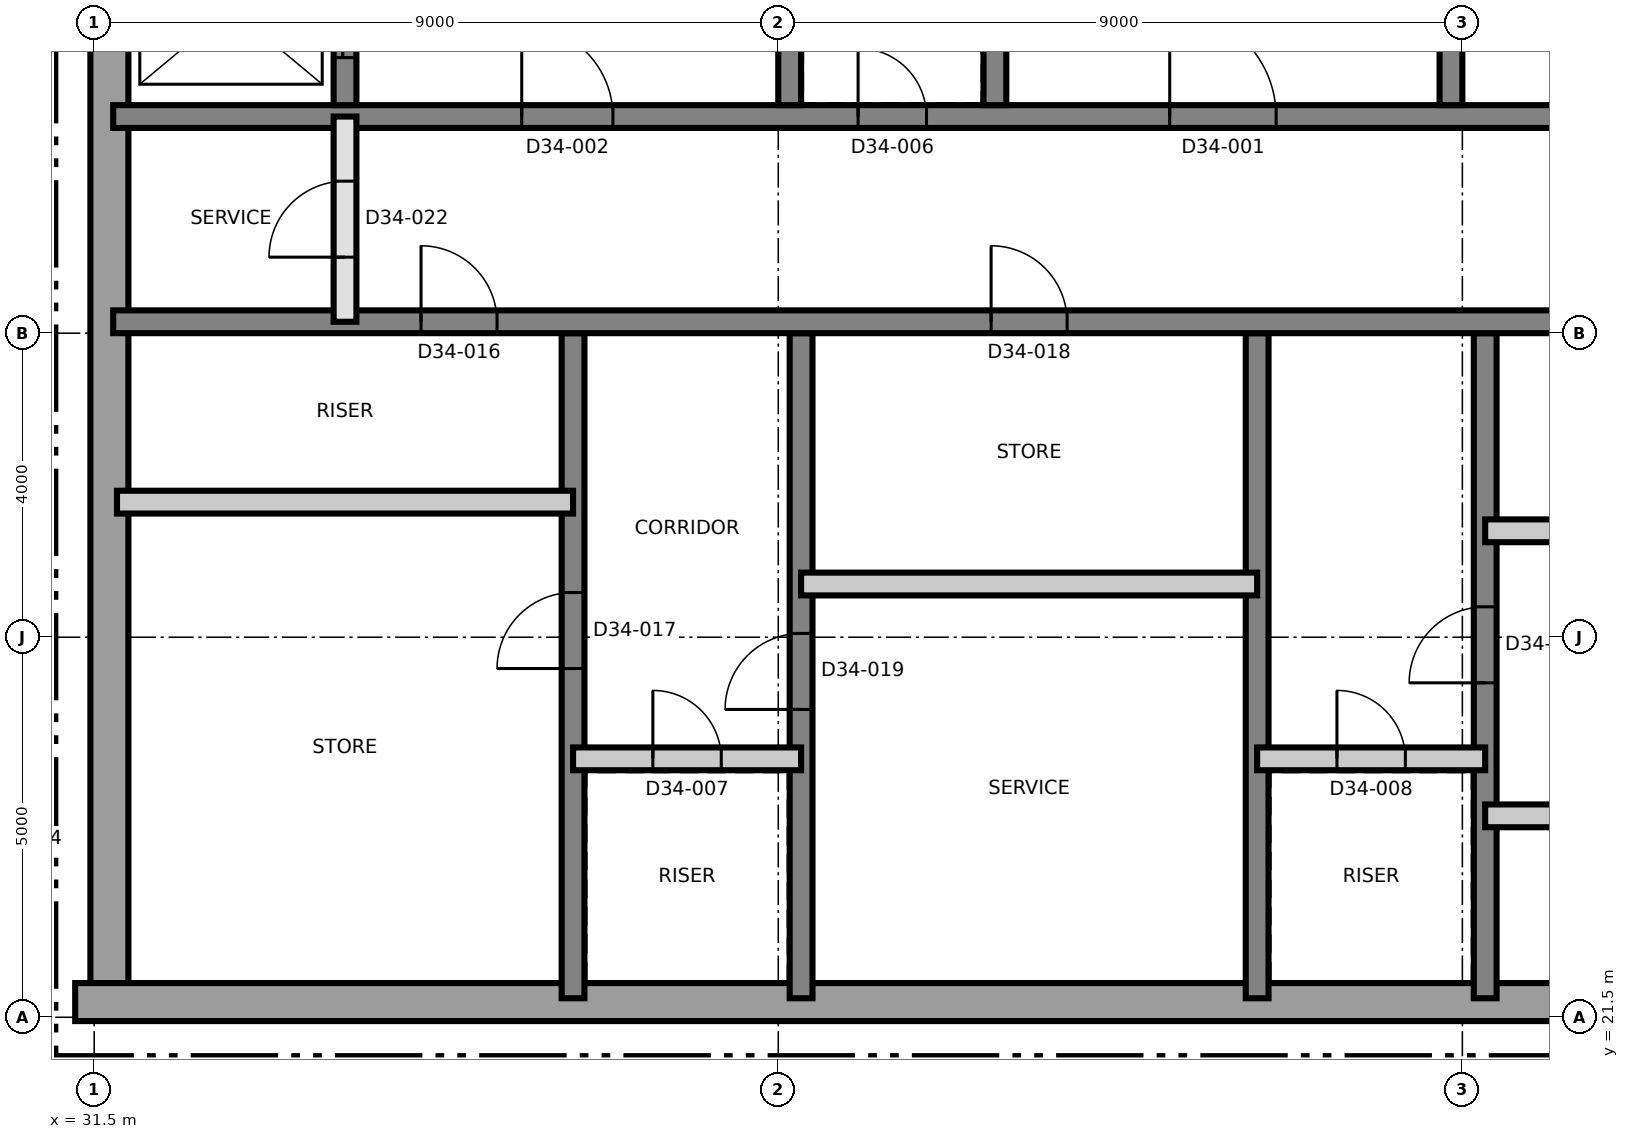
"""IFC4 building model, lengths in metres.
Left out: names, types, materials, properties, quantities, classifications, styles, units other than length and angle.
Written with IfcOpenShell. Run it as: python <this file> out.ifc"""

import sys

from ifc_helpers import new_model, si_unit, direction, frame, frame_2d, origin, place, context, subcontext, project, spatial, polyline, rectangle, outline, extrude, element, fill, save


model = new_model("IFC4")
c1 = context("Model", 3, precision=1e-05, world=origin(), true_north=direction((0.0, 1.0)))
c2 = subcontext(c1, "Body", "Model", "MODEL_VIEW")
j1 = project(units=[si_unit("LENGTHUNIT", "METRE"), si_unit("PLANEANGLEUNIT", "RADIAN")], contexts=[c1])
p1 = place(None, origin())
s1 = spatial("IfcSite", under=j1, at=p1, CompositionType="ELEMENT")
p2 = place(p1, origin())
s2 = spatial("IfcBuilding", under=s1, at=p2, CompositionType="ELEMENT")
p3 = place(p2, frame((0.0, 0.0, 281.3)))
s3 = spatial("IfcBuildingStorey", under=s2, at=p3, CompositionType="ELEMENT", Elevation=281.3)
p4 = place(p3, frame((31.7, 21.75, 0.0), z_axis=(0.0, 0.0, 1.0), x_axis=(0.0, 1.0, 0.0)))
e1 = element("IfcWall", 1, at=p4, inside=s3, PredefinedType="SHEAR", context=c2, shape_type="SweptSolid", body=[
    extrude(outline(polyline([(0.0, 0.0), (17.5, 0.0), (17.5, 2.46), (14.941, 4.2), (0.0, 4.2), (0.0, 0.0)])), frame((0.0, 0.25, 0.0), z_axis=(0.0, -1.0, 0.0), x_axis=(1.0, 0.0, 0.0)), (0.0, 0.0, 1.0), 0.5),
])
p5 = place(p3, frame((31.25, 21.7, 0.0), z_axis=(0.0, 0.0, 1.0), x_axis=(1.0, 0.0, 0.0)))
e2 = element("IfcWall", 2, at=p5, inside=s3, PredefinedType="SHEAR", context=c2, shape_type="SweptSolid", body=[
    extrude(rectangle(XDim=27.0, YDim=0.5, at=frame_2d((13.5, 0.0))), origin(), (0.0, 0.0, 1.0), 4.2),
])
p6 = place(p3, frame((37.8, 21.75, 0.0), z_axis=(0.0, 0.0, 1.0), x_axis=(0.0, 1.0, 0.0)))
e3 = element("IfcWall", 3, at=p6, inside=s3, PredefinedType="SHEAR", context=c2, shape_type="SweptSolid", body=[
    extrude(rectangle(XDim=8.75, YDim=0.3, at=frame_2d((4.375, 0.0))), origin(), (0.0, 0.0, 1.0), 4.2),
])
p7 = place(p6, frame((4.338, 0.0, 0.0)))
e4 = element("IfcOpeningElement", 4, at=p7, cuts=e3, PredefinedType="OPENING", context=c2, shape_type="SweptSolid", body=[
    extrude(rectangle(XDim=1.0, YDim=2.1, at=frame_2d((0.5, 1.05))), frame((0.0, 0.16, 0.0), z_axis=(0.0, -1.0, 0.0), x_axis=(1.0, 0.0, 0.0)), (0.0, 0.0, 1.0), 0.32),
])
p8 = place(p3, frame((40.8, 21.75, 0.0), z_axis=(0.0, 0.0, 1.0), x_axis=(0.0, 1.0, 0.0)))
e5 = element("IfcWall", 5, at=p8, inside=s3, PredefinedType="SHEAR", context=c2, shape_type="SweptSolid", body=[
    extrude(rectangle(XDim=8.75, YDim=0.3, at=frame_2d((4.375, 0.0))), origin(), (0.0, 0.0, 1.0), 4.2),
])
p9 = place(p8, frame((3.8, 0.0, 0.0)))
e6 = element("IfcOpeningElement", 6, at=p9, cuts=e5, PredefinedType="OPENING", context=c2, shape_type="SweptSolid", body=[
    extrude(rectangle(XDim=1.0, YDim=2.1, at=frame_2d((0.5, 1.05))), frame((0.0, 0.16, 0.0), z_axis=(0.0, -1.0, 0.0), x_axis=(1.0, 0.0, 0.0)), (0.0, 0.0, 1.0), 0.32),
])
p10 = place(p3, frame((46.8, 21.75, 0.0), z_axis=(0.0, 0.0, 1.0), x_axis=(0.0, 1.0, 0.0)))
e7 = element("IfcWall", 7, at=p10, inside=s3, PredefinedType="SHEAR", context=c2, shape_type="SweptSolid", body=[
    extrude(rectangle(XDim=8.75, YDim=0.3, at=frame_2d((4.375, 0.0))), origin(), (0.0, 0.0, 1.0), 4.2),
])
p11 = place(p3, frame((49.8, 21.75, 0.0), z_axis=(0.0, 0.0, 1.0), x_axis=(0.0, 1.0, 0.0)))
e8 = element("IfcWall", 8, at=p11, inside=s3, PredefinedType="SHEAR", context=c2, shape_type="SweptSolid", body=[
    extrude(rectangle(XDim=8.75, YDim=0.3, at=frame_2d((4.375, 0.0))), origin(), (0.0, 0.0, 1.0), 4.2),
])
p12 = place(p11, frame((4.15, 0.0, 0.0)))
e9 = element("IfcOpeningElement", 9, at=p12, cuts=e8, PredefinedType="OPENING", context=c2, shape_type="SweptSolid", body=[
    extrude(rectangle(XDim=1.0, YDim=2.1, at=frame_2d((0.5, 1.05))), frame((0.0, 0.16, 0.0), z_axis=(0.0, -1.0, 0.0), x_axis=(1.0, 0.0, 0.0)), (0.0, 0.0, 1.0), 0.32),
])
p13 = place(p3, frame((31.75, 30.65, 0.0), z_axis=(0.0, 0.0, 1.0), x_axis=(1.0, 0.0, 0.0)))
e10 = element("IfcWall", 10, at=p13, inside=s3, PredefinedType="SHEAR", context=c2, shape_type="SweptSolid", body=[
    extrude(rectangle(XDim=26.5, YDim=0.3, at=frame_2d((13.25, 0.0))), origin(), (0.0, 0.0, 1.0), 4.2),
])
p14 = place(p13, frame((24.75, 0.0, 0.0)))
e11 = element("IfcOpeningElement", 11, at=p14, cuts=e10, PredefinedType="OPENING", context=c2, shape_type="SweptSolid", body=[
    extrude(rectangle(XDim=1.0, YDim=2.1, at=frame_2d((0.5, 1.05))), frame((0.0, 0.16, 0.0), z_axis=(0.0, -1.0, 0.0), x_axis=(1.0, 0.0, 0.0)), (0.0, 0.0, 1.0), 0.32),
])
p15 = place(p13, frame((4.05, 0.0, 0.0)))
e12 = element("IfcOpeningElement", 12, at=p15, cuts=e10, PredefinedType="OPENING", context=c2, shape_type="SweptSolid", body=[
    extrude(rectangle(XDim=1.0, YDim=2.1, at=frame_2d((0.5, 1.05))), frame((0.0, 0.16, 0.0), z_axis=(0.0, -1.0, 0.0), x_axis=(1.0, 0.0, 0.0)), (0.0, 0.0, 1.0), 0.32),
])
p16 = place(p13, frame((11.55, 0.0, 0.0)))
e13 = element("IfcOpeningElement", 13, at=p16, cuts=e10, PredefinedType="OPENING", context=c2, shape_type="SweptSolid", body=[
    extrude(rectangle(XDim=1.0, YDim=2.1, at=frame_2d((0.5, 1.05))), frame((0.0, 0.16, 0.0), z_axis=(0.0, -1.0, 0.0), x_axis=(1.0, 0.0, 0.0)), (0.0, 0.0, 1.0), 0.32),
])
p17 = place(p3, frame((31.75, 33.35, 0.0), z_axis=(0.0, 0.0, 1.0), x_axis=(1.0, 0.0, 0.0)))
e14 = element("IfcWall", 14, at=p17, inside=s3, PredefinedType="SHEAR", context=c2, shape_type="SweptSolid", body=[
    extrude(rectangle(XDim=26.5, YDim=0.3, at=frame_2d((13.25, 0.0))), origin(), (0.0, 0.0, 1.0), 4.2),
])
p18 = place(p17, frame((13.9, 0.0, 0.0)))
e15 = element("IfcOpeningElement", 15, at=p18, cuts=e14, PredefinedType="OPENING", context=c2, shape_type="SweptSolid", body=[
    extrude(rectangle(XDim=1.4, YDim=2.1, at=frame_2d((0.7, 1.05))), frame((0.0, 0.16, 0.0), z_axis=(0.0, -1.0, 0.0), x_axis=(1.0, 0.0, 0.0)), (0.0, 0.0, 1.0), 0.32),
])
p19 = place(p17, frame((5.375, 0.0, 0.0)))
e16 = element("IfcOpeningElement", 16, at=p19, cuts=e14, PredefinedType="OPENING", context=c2, shape_type="SweptSolid", body=[
    extrude(rectangle(XDim=1.2, YDim=2.1, at=frame_2d((0.6, 1.05))), frame((0.0, 0.16, 0.0), z_axis=(0.0, -1.0, 0.0), x_axis=(1.0, 0.0, 0.0)), (0.0, 0.0, 1.0), 0.32),
])
p20 = place(p17, frame((19.925, 0.0, 0.0)))
e17 = element("IfcOpeningElement", 17, at=p20, cuts=e14, PredefinedType="OPENING", context=c2, shape_type="SweptSolid", body=[
    extrude(rectangle(XDim=1.2, YDim=2.1, at=frame_2d((0.6, 1.05))), frame((0.0, 0.16, 0.0), z_axis=(0.0, -1.0, 0.0), x_axis=(1.0, 0.0, 0.0)), (0.0, 0.0, 1.0), 0.32),
])
p21 = place(p17, frame((9.8, 0.0, 0.0)))
e18 = element("IfcOpeningElement", 18, at=p21, cuts=e14, PredefinedType="OPENING", context=c2, shape_type="SweptSolid", body=[
    extrude(rectangle(XDim=0.9, YDim=2.1, at=frame_2d((0.45, 1.05))), frame((0.0, 0.16, 0.0), z_axis=(0.0, -1.0, 0.0), x_axis=(1.0, 0.0, 0.0)), (0.0, 0.0, 1.0), 0.32),
])
for number, where, z_axis, x_axis in (
    (19, (40.65, 33.5, 0.0), (0.0, 0.0, 1.0), (0.0, 1.0, 0.0)),
    (20, (43.35, 33.5, 0.0), (0.0, 0.0, 1.0), (0.0, 1.0, 0.0)),
):
    element("IfcWall", number, at=place(p3, frame(where, z_axis=z_axis, x_axis=x_axis)), inside=s3, PredefinedType="SHEAR", context=c2, shape_type="SweptSolid", body=[
        extrude(outline(polyline([(0.0, 0.0), (5.75, 0.0), (5.75, 2.46), (3.191, 4.2), (0.0, 4.2), (0.0, 0.0)])), frame((0.0, 0.15, 0.0), z_axis=(0.0, -1.0, 0.0), x_axis=(1.0, 0.0, 0.0)), (0.0, 0.0, 1.0), 0.3),
    ])
p22 = place(p3, frame((34.8, 33.5, 0.0), z_axis=(0.0, 0.0, 1.0), x_axis=(0.0, 1.0, 0.0)))
e21 = element("IfcWall", 21, at=p22, inside=s3, PredefinedType="SHEAR", context=c2, shape_type="SweptSolid", body=[
    extrude(rectangle(XDim=2.55, YDim=0.3, at=frame_2d((1.275, 0.0))), origin(), (0.0, 0.0, 1.0), 4.2),
])
p23 = place(p22, frame((0.625, 0.0, 0.0)))
e22 = element("IfcOpeningElement", 22, at=p23, cuts=e21, PredefinedType="OPENING", context=c2, shape_type="SweptSolid", body=[
    extrude(rectangle(XDim=1.3, YDim=2.4, at=frame_2d((0.65, 1.2))), frame((0.0, 0.16, 0.0), z_axis=(0.0, -1.0, 0.0), x_axis=(1.0, 0.0, 0.0)), (0.0, 0.0, 1.0), 0.32),
])
p24 = place(p3, frame((49.35, 33.5, 0.0), z_axis=(0.0, 0.0, 1.0), x_axis=(0.0, 1.0, 0.0)))
e23 = element("IfcWall", 23, at=p24, inside=s3, PredefinedType="SHEAR", context=c2, shape_type="SweptSolid", body=[
    extrude(outline(polyline([(0.0, 0.0), (5.75, 0.0), (5.75, 2.46), (3.191, 4.2), (0.0, 4.2), (0.0, 0.0)])), frame((0.0, 0.15, 0.0), z_axis=(0.0, -1.0, 0.0), x_axis=(1.0, 0.0, 0.0)), (0.0, 0.0, 1.0), 0.3),
])
p25 = place(p3, frame((49.8, 24.15, 0.0), z_axis=(0.0, 0.0, 1.0), x_axis=(1.0, 0.0, 0.0)))
e24 = element("IfcWall", 24, at=p25, inside=s3, PredefinedType="PARTITIONING", context=c2, shape_type="SweptSolid", body=[
    extrude(rectangle(XDim=6.0, YDim=0.3, at=frame_2d((3.0, 0.0))), origin(), (0.0, 0.0, 1.0), 3.9),
])
p26 = place(p25, frame((2.5, 0.0, 0.0)))
e25 = element("IfcOpeningElement", 25, at=p26, cuts=e24, PredefinedType="OPENING", context=c2, shape_type="SweptSolid", body=[
    extrude(rectangle(XDim=1.0, YDim=2.1, at=frame_2d((0.5, 1.05))), frame((0.0, 0.16, 0.0), z_axis=(0.0, -1.0, 0.0), x_axis=(1.0, 0.0, 0.0)), (0.0, 0.0, 1.0), 0.32),
])
p27 = place(p3, frame((37.8, 24.9, 0.0), z_axis=(0.0, 0.0, 1.0), x_axis=(1.0, 0.0, 0.0)))
e26 = element("IfcWall", 26, at=p27, inside=s3, PredefinedType="PARTITIONING", context=c2, shape_type="SweptSolid", body=[
    extrude(rectangle(XDim=3.0, YDim=0.3, at=frame_2d((1.5, 0.0))), origin(), (0.0, 0.0, 1.0), 3.9),
])
p28 = place(p27, frame((1.05, 0.0, 0.0)))
e27 = element("IfcOpeningElement", 27, at=p28, cuts=e26, PredefinedType="OPENING", context=c2, shape_type="SweptSolid", body=[
    extrude(rectangle(XDim=0.9, YDim=2.1, at=frame_2d((0.45, 1.05))), frame((0.0, 0.16, 0.0), z_axis=(0.0, -1.0, 0.0), x_axis=(1.0, 0.0, 0.0)), (0.0, 0.0, 1.0), 0.32),
])
p29 = place(p3, frame((46.8, 24.9, 0.0), z_axis=(0.0, 0.0, 1.0), x_axis=(1.0, 0.0, 0.0)))
e28 = element("IfcWall", 28, at=p29, inside=s3, PredefinedType="PARTITIONING", context=c2, shape_type="SweptSolid", body=[
    extrude(rectangle(XDim=3.0, YDim=0.3, at=frame_2d((1.5, 0.0))), origin(), (0.0, 0.0, 1.0), 3.9),
])
p30 = place(p29, frame((1.05, 0.0, 0.0)))
e29 = element("IfcOpeningElement", 29, at=p30, cuts=e28, PredefinedType="OPENING", context=c2, shape_type="SweptSolid", body=[
    extrude(rectangle(XDim=0.9, YDim=2.1, at=frame_2d((0.45, 1.05))), frame((0.0, 0.16, 0.0), z_axis=(0.0, -1.0, 0.0), x_axis=(1.0, 0.0, 0.0)), (0.0, 0.0, 1.0), 0.32),
])
for number, where, z_axis, x_axis in (
    (30, (40.8, 27.2, 0.0), (0.0, 0.0, 1.0), (1.0, 0.0, 0.0)),
    (31, (49.8, 27.9, 0.0), (0.0, 0.0, 1.0), (1.0, 0.0, 0.0)),
    (32, (31.8, 28.277, 0.0), (0.0, 0.0, 1.0), (1.0, 0.0, 0.0)),
):
    element("IfcWall", number, at=place(p3, frame(where, z_axis=z_axis, x_axis=x_axis)), inside=s3, PredefinedType="PARTITIONING", context=c2, shape_type="SweptSolid", body=[
        extrude(rectangle(XDim=6.0, YDim=0.3, at=frame_2d((3.0, 0.0))), origin(), (0.0, 0.0, 1.0), 3.9),
    ])
p31 = place(p3, frame((34.8, 30.65, 0.0), z_axis=(0.0, 0.0, 1.0), x_axis=(0.0, 1.0, 0.0)))
e33 = element("IfcWall", 33, at=p31, inside=s3, PredefinedType="SOLIDWALL", context=c2, shape_type="SweptSolid", body=[
    extrude(rectangle(XDim=2.7, YDim=0.3, at=frame_2d((1.35, 0.0))), origin(), (0.0, 0.0, 1.0), 3.9),
])
p32 = place(p31, frame((0.85, 0.0, 0.0)))
e34 = element("IfcOpeningElement", 34, at=p32, cuts=e33, PredefinedType="OPENING", context=c2, shape_type="SweptSolid", body=[
    extrude(rectangle(XDim=1.0, YDim=2.1, at=frame_2d((0.5, 1.05))), frame((0.0, 0.16, 0.0), z_axis=(0.0, -1.0, 0.0), x_axis=(1.0, 0.0, 0.0)), (0.0, 0.0, 1.0), 0.32),
])
p33 = place(p18, origin())
e35 = element("IfcDoor", 35, at=p33, inside=s3, OperationType="SINGLE_SWING_RIGHT", PredefinedType="DOOR", context=c2, shape_type="SweptSolid", body=[
    extrude(rectangle(XDim=1.4, YDim=2.1, at=frame_2d((0.7, 1.05))), frame((0.0, 0.025, 0.0), z_axis=(0.0, -1.0, 0.0), x_axis=(1.0, 0.0, 0.0)), (0.0, 0.0, 1.0), 0.05),
])
fill(e15, e35)
p34 = place(p19, origin())
e36 = element("IfcDoor", 36, at=p34, inside=s3, OperationType="SINGLE_SWING_LEFT", PredefinedType="DOOR", context=c2, shape_type="SweptSolid", body=[
    extrude(rectangle(XDim=1.2, YDim=2.1, at=frame_2d((0.6, 1.05))), frame((0.0, 0.025, 0.0), z_axis=(0.0, -1.0, 0.0), x_axis=(1.0, 0.0, 0.0)), (0.0, 0.0, 1.0), 0.05),
])
fill(e16, e36)
p35 = place(p21, origin())
e37 = element("IfcDoor", 37, at=p35, inside=s3, OperationType="SINGLE_SWING_LEFT", PredefinedType="DOOR", context=c2, shape_type="SweptSolid", body=[
    extrude(rectangle(XDim=0.9, YDim=2.1, at=frame_2d((0.45, 1.05))), frame((0.0, 0.025, 0.0), z_axis=(0.0, -1.0, 0.0), x_axis=(1.0, 0.0, 0.0)), (0.0, 0.0, 1.0), 0.05),
])
fill(e18, e37)
p36 = place(p28, origin())
e38 = element("IfcDoor", 38, at=p36, inside=s3, OperationType="SINGLE_SWING_LEFT", PredefinedType="DOOR", context=c2, shape_type="SweptSolid", body=[
    extrude(rectangle(XDim=0.9, YDim=2.1, at=frame_2d((0.45, 1.05))), frame((0.0, 0.025, 0.0), z_axis=(0.0, -1.0, 0.0), x_axis=(1.0, 0.0, 0.0)), (0.0, 0.0, 1.0), 0.05),
])
fill(e27, e38)
p37 = place(p30, origin())
e39 = element("IfcDoor", 39, at=p37, inside=s3, OperationType="SINGLE_SWING_RIGHT", PredefinedType="DOOR", context=c2, shape_type="SweptSolid", body=[
    extrude(rectangle(XDim=0.9, YDim=2.1, at=frame_2d((0.45, 1.05))), frame((0.0, 0.025, 0.0), z_axis=(0.0, -1.0, 0.0), x_axis=(1.0, 0.0, 0.0)), (0.0, 0.0, 1.0), 0.05),
])
fill(e29, e39)
p38 = place(p23, origin())
e40 = element("IfcDoor", 40, at=p38, inside=s3, OperationType="SLIDING_TO_LEFT", PredefinedType="DOOR", context=c2, shape_type="SweptSolid", body=[
    extrude(rectangle(XDim=1.3, YDim=2.4, at=frame_2d((0.65, 1.2))), frame((0.0, 0.025, 0.0), z_axis=(0.0, -1.0, 0.0), x_axis=(1.0, 0.0, 0.0)), (0.0, 0.0, 1.0), 0.05),
])
fill(e22, e40)
p39 = place(p15, origin())
e41 = element("IfcDoor", 41, at=p39, inside=s3, OperationType="SINGLE_SWING_LEFT", PredefinedType="DOOR", context=c2, shape_type="SweptSolid", body=[
    extrude(rectangle(XDim=1.0, YDim=2.1, at=frame_2d((0.5, 1.05))), frame((0.0, 0.025, 0.0), z_axis=(0.0, -1.0, 0.0), x_axis=(1.0, 0.0, 0.0)), (0.0, 0.0, 1.0), 0.05),
])
fill(e12, e41)
p40 = place(p7, origin())
e42 = element("IfcDoor", 42, at=p40, inside=s3, OperationType="SINGLE_SWING_RIGHT", PredefinedType="DOOR", context=c2, shape_type="SweptSolid", body=[
    extrude(rectangle(XDim=1.0, YDim=2.1, at=frame_2d((0.5, 1.05))), frame((0.0, 0.025, 0.0), z_axis=(0.0, -1.0, 0.0), x_axis=(1.0, 0.0, 0.0)), (0.0, 0.0, 1.0), 0.05),
])
fill(e4, e42)
p41 = place(p16, origin())
e43 = element("IfcDoor", 43, at=p41, inside=s3, OperationType="SINGLE_SWING_LEFT", PredefinedType="DOOR", context=c2, shape_type="SweptSolid", body=[
    extrude(rectangle(XDim=1.0, YDim=2.1, at=frame_2d((0.5, 1.05))), frame((0.0, 0.025, 0.0), z_axis=(0.0, -1.0, 0.0), x_axis=(1.0, 0.0, 0.0)), (0.0, 0.0, 1.0), 0.05),
])
fill(e13, e43)
p42 = place(p9, origin())
e44 = element("IfcDoor", 44, at=p42, inside=s3, OperationType="SINGLE_SWING_RIGHT", PredefinedType="DOOR", context=c2, shape_type="SweptSolid", body=[
    extrude(rectangle(XDim=1.0, YDim=2.1, at=frame_2d((0.5, 1.05))), frame((0.0, 0.025, 0.0), z_axis=(0.0, -1.0, 0.0), x_axis=(1.0, 0.0, 0.0)), (0.0, 0.0, 1.0), 0.05),
])
fill(e6, e44)
p43 = place(p12, origin())
e45 = element("IfcDoor", 45, at=p43, inside=s3, OperationType="SINGLE_SWING_LEFT", PredefinedType="DOOR", context=c2, shape_type="SweptSolid", body=[
    extrude(rectangle(XDim=1.0, YDim=2.1, at=frame_2d((0.5, 1.05))), frame((0.0, 0.025, 0.0), z_axis=(0.0, -1.0, 0.0), x_axis=(1.0, 0.0, 0.0)), (0.0, 0.0, 1.0), 0.05),
])
fill(e9, e45)
p44 = place(p32, origin())
e46 = element("IfcDoor", 46, at=p44, inside=s3, OperationType="SINGLE_SWING_LEFT", PredefinedType="DOOR", context=c2, shape_type="SweptSolid", body=[
    extrude(rectangle(XDim=1.0, YDim=2.1, at=frame_2d((0.5, 1.05))), frame((0.0, 0.025, 0.0), z_axis=(0.0, -1.0, 0.0), x_axis=(1.0, 0.0, 0.0)), (0.0, 0.0, 1.0), 0.05),
])
fill(e34, e46)
save(model, sys.argv[1])
